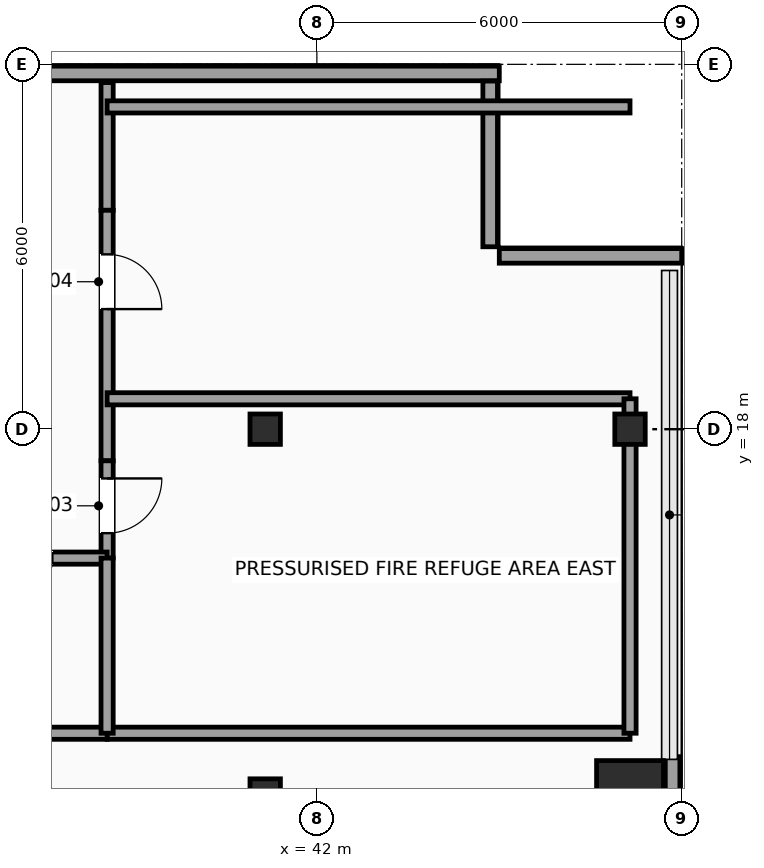
"""IFC4 building model, lengths in metres.
Left out: names, types, materials, properties, quantities, classifications, styles, units other than length and angle.
Written with IfcOpenShell. Run it as: python <this file> out.ifc"""

import sys

from ifc_helpers import new_model, si_unit, direction, frame, frame_2d, origin, origin_2d, place, context, subcontext, project, spatial, rectangle, hollow_rectangle, extrude, element, fill, save


model = new_model("IFC4")
c1 = context("Model", 3, precision=1e-05, world=origin(), true_north=direction((0.0, 1.0)))
c2 = subcontext(c1, "Body", "Model", "MODEL_VIEW")
j1 = project(units=[si_unit("LENGTHUNIT", "METRE"), si_unit("PLANEANGLEUNIT", "RADIAN")], contexts=[c1])
p1 = place(None, origin())
s1 = spatial("IfcSite", under=j1, at=p1, CompositionType="ELEMENT")
p2 = place(p1, origin())
s2 = spatial("IfcBuilding", under=s1, at=p2, CompositionType="ELEMENT")
p3 = place(p2, frame((0.0, 0.0, 164.4)))
s3 = spatial("IfcBuildingStorey", under=s2, at=p3, CompositionType="ELEMENT", Elevation=164.4)
for number, where, z_axis, x_axis in (
    (1, (41.15, 12.0, 0.0), (0.0, 0.0, 1.0), (1.0, 0.0, 0.0)),
    (2, (41.15, 18.0, 0.0), (0.0, 0.0, 1.0), (1.0, 0.0, 0.0)),
):
    element("IfcColumn", number, at=place(p3, frame(where, z_axis=z_axis, x_axis=x_axis)), inside=s3, PredefinedType="COLUMN", context=c2, shape_type="SweptSolid", body=[
        extrude(hollow_rectangle(XDim=0.5, YDim=0.5, WallThickness=0.025, InnerFilletRadius=0.025, OuterFilletRadius=0.04, at=origin_2d()), origin(), (0.0, 0.0, 1.0), 4.8),
    ])
p4 = place(p3, frame((47.15, 12.0, 0.0), z_axis=(0.0, 0.0, 1.0), x_axis=(1.0, 0.0, 0.0)))
e3 = element("IfcColumn", 3, at=p4, inside=s3, PredefinedType="COLUMN", context=c2, shape_type="SweptSolid", body=[
    extrude(rectangle(XDim=1.1, YDim=1.1, at=origin_2d()), origin(), (0.0, 0.0, 1.0), 4.56),
])
p5 = place(p3, frame((47.15, 18.0, 0.0), z_axis=(0.0, 0.0, 1.0), x_axis=(1.0, 0.0, 0.0)))
e4 = element("IfcColumn", 4, at=p5, inside=s3, PredefinedType="COLUMN", context=c2, shape_type="SweptSolid", body=[
    extrude(hollow_rectangle(XDim=0.5, YDim=0.5, WallThickness=0.025, InnerFilletRadius=0.025, OuterFilletRadius=0.04, at=origin_2d()), origin(), (0.0, 0.0, 1.0), 4.56),
])
p6 = place(p3, frame((24.0, 23.85, 0.0), z_axis=(0.0, 0.0, 1.0), x_axis=(1.0, 0.0, 0.0)))
e5 = element("IfcWall", 5, at=p6, inside=s3, PredefinedType="SOLIDWALL", context=c2, shape_type="SweptSolid", body=[
    extrude(rectangle(XDim=21.0, YDim=0.24, at=frame_2d((10.5, 0.0))), origin(), (0.0, 0.0, 1.0), 4.59),
])
p7 = place(p3, frame((44.85, 23.725, 0.0), z_axis=(0.0, 0.0, 1.0), x_axis=(0.0, -1.0, 0.0)))
e6 = element("IfcWall", 6, at=p7, inside=s3, PredefinedType="SOLIDWALL", context=c2, shape_type="SweptSolid", body=[
    extrude(rectangle(XDim=2.725, YDim=0.24, at=frame_2d((1.363, 0.0))), origin(), (0.0, 0.0, 1.0), 4.59),
])
p8 = place(p3, frame((45.0, 20.85, 0.0), z_axis=(0.0, 0.0, 1.0), x_axis=(1.0, 0.0, 0.0)))
e7 = element("IfcWall", 7, at=p8, inside=s3, PredefinedType="SOLIDWALL", context=c2, shape_type="SweptSolid", body=[
    extrude(rectangle(XDim=3.0, YDim=0.24, at=frame_2d((1.5, 0.0))), origin(), (0.0, 0.0, 1.0), 4.59),
])
p9 = place(p3, frame((47.85, 12.615, 0.0), z_axis=(0.0, 0.0, 1.0), x_axis=(0.0, -1.0, 0.0)))
e8 = element("IfcWall", 8, at=p9, inside=s3, PredefinedType="SOLIDWALL", context=c2, shape_type="SweptSolid", body=[
    extrude(rectangle(XDim=1.23, YDim=0.24, at=frame_2d((0.615, 0.0))), origin(), (0.0, 0.0, 1.0), 4.59),
])
p10 = place(p3, frame((38.55, 23.7, 0.0), z_axis=(0.0, 0.0, 1.0), x_axis=(0.0, -1.0, 0.0)))
e9 = element("IfcWall", 9, at=p10, inside=s3, PredefinedType="SOLIDWALL", context=c2, shape_type="SweptSolid", body=[
    extrude(rectangle(XDim=2.1, YDim=0.2, at=frame_2d((1.05, 0.0))), origin(), (0.0, 0.0, 1.0), 4.59),
])
p11 = place(p3, frame((38.55, 21.6, 0.0), z_axis=(0.0, 0.0, 1.0), x_axis=(0.0, -1.0, 0.0)))
e10 = element("IfcWall", 10, at=p11, inside=s3, PredefinedType="SOLIDWALL", context=c2, shape_type="SweptSolid", body=[
    extrude(rectangle(XDim=4.12, YDim=0.2, at=frame_2d((2.06, 0.0))), origin(), (0.0, 0.0, 1.0), 4.59),
])
p12 = place(p11, frame((0.725, 0.0, 0.0)))
e11 = element("IfcOpeningElement", 11, at=p12, cuts=e10, PredefinedType="OPENING", context=c2, shape_type="SweptSolid", body=[
    extrude(rectangle(XDim=0.9, YDim=2.15, at=frame_2d((0.45, 1.075))), frame((0.0, 0.11, 0.0), z_axis=(0.0, -1.0, 0.0), x_axis=(1.0, 0.0, 0.0)), (0.0, 0.0, 1.0), 0.22),
])
p13 = place(p3, frame((38.55, 17.48, 0.0), z_axis=(0.0, 0.0, 1.0), x_axis=(0.0, -1.0, 0.0)))
e12 = element("IfcWall", 12, at=p13, inside=s3, PredefinedType="SOLIDWALL", context=c2, shape_type="SweptSolid", body=[
    extrude(rectangle(XDim=1.6, YDim=0.2, at=frame_2d((0.8, 0.0))), origin(), (0.0, 0.0, 1.0), 4.59),
])
p14 = place(p13, frame((0.29, 0.0, 0.0)))
e13 = element("IfcOpeningElement", 13, at=p14, cuts=e12, PredefinedType="OPENING", context=c2, shape_type="SweptSolid", body=[
    extrude(rectangle(XDim=0.9, YDim=2.15, at=frame_2d((0.45, 1.075))), frame((0.0, 0.11, 0.0), z_axis=(0.0, -1.0, 0.0), x_axis=(1.0, 0.0, 0.0)), (0.0, 0.0, 1.0), 0.22),
])
p15 = place(p3, frame((38.55, 15.88, 0.0), z_axis=(0.0, 0.0, 1.0), x_axis=(-1.0, 0.0, 0.0)))
e14 = element("IfcWall", 14, at=p15, inside=s3, PredefinedType="SOLIDWALL", context=c2, shape_type="SweptSolid", body=[
    extrude(rectangle(XDim=2.3, YDim=0.2, at=frame_2d((1.15, 0.0))), origin(), (0.0, 0.0, 1.0), 4.59),
])
p16 = place(p15, frame((0.9, 0.0, 0.0)))
e15 = element("IfcOpeningElement", 15, at=p16, cuts=e14, PredefinedType="OPENING", context=c2, shape_type="SweptSolid", body=[
    extrude(rectangle(XDim=0.9, YDim=2.15, at=frame_2d((0.45, 1.075))), frame((0.0, 0.11, 0.0), z_axis=(0.0, -1.0, 0.0), x_axis=(1.0, 0.0, 0.0)), (0.0, 0.0, 1.0), 0.22),
])
for number, where, z_axis, x_axis in (
    (16, (38.55, 13.0, 0.0), (0.0, 0.0, 1.0), (1.0, 0.0, 0.0)),
    (17, (38.55, 18.5, 0.0), (0.0, 0.0, 1.0), (1.0, 0.0, 0.0)),
):
    element("IfcWall", number, at=place(p3, frame(where, z_axis=z_axis, x_axis=x_axis)), inside=s3, PredefinedType="SOLIDWALL", context=c2, shape_type="SweptSolid", body=[
        extrude(rectangle(XDim=8.6, YDim=0.2, at=frame_2d((4.3, 0.0))), origin(), (0.0, 0.0, 1.0), 4.59),
    ])
p17 = place(p3, frame((47.15, 13.0, 0.0), z_axis=(0.0, 0.0, 1.0), x_axis=(0.0, 1.0, 0.0)))
e18 = element("IfcWall", 18, at=p17, inside=s3, PredefinedType="SOLIDWALL", context=c2, shape_type="SweptSolid", body=[
    extrude(rectangle(XDim=5.5, YDim=0.2, at=frame_2d((2.75, 0.0))), origin(), (0.0, 0.0, 1.0), 4.052),
])
p18 = place(p3, frame((38.55, 23.3, 0.0), z_axis=(0.0, 0.0, 1.0), x_axis=(1.0, 0.0, 0.0)))
e19 = element("IfcWall", 19, at=p18, inside=s3, PredefinedType="SOLIDWALL", context=c2, shape_type="SweptSolid", body=[
    extrude(rectangle(XDim=8.6, YDim=0.2, at=frame_2d((4.3, 0.0))), origin(), (0.0, 0.0, 1.0), 4.59),
])
p19 = place(p3, frame((33.65, 13.0, 0.0), z_axis=(0.0, 0.0, 1.0), x_axis=(1.0, 0.0, 0.0)))
e20 = element("IfcWall", 20, at=p19, inside=s3, PredefinedType="SOLIDWALL", context=c2, shape_type="SweptSolid", body=[
    extrude(rectangle(XDim=4.9, YDim=0.2, at=frame_2d((2.45, 0.0))), origin(), (0.0, 0.0, 1.0), 4.59),
])
p20 = place(p3, frame((38.55, 13.0, 0.0), z_axis=(0.0, 0.0, 1.0), x_axis=(0.0, 1.0, 0.0)))
e21 = element("IfcWall", 21, at=p20, inside=s3, PredefinedType="SOLIDWALL", context=c2, shape_type="SweptSolid", body=[
    extrude(rectangle(XDim=2.88, YDim=0.2, at=frame_2d((1.44, 0.0))), origin(), (0.0, 0.0, 1.0), 4.59),
])
p21 = place(p12, origin())
e22 = element("IfcDoor", 22, at=p21, inside=s3, OperationType="SINGLE_SWING_RIGHT", PredefinedType="DOOR", context=c2, shape_type="SweptSolid", body=[
    extrude(rectangle(XDim=0.9, YDim=2.15, at=frame_2d((0.45, 1.075))), frame((0.0, 0.025, 0.0), z_axis=(0.0, -1.0, 0.0), x_axis=(1.0, 0.0, 0.0)), (0.0, 0.0, 1.0), 0.05),
])
fill(e11, e22)
p22 = place(p14, origin())
e23 = element("IfcDoor", 23, at=p22, inside=s3, OperationType="SINGLE_SWING_LEFT", PredefinedType="DOOR", context=c2, shape_type="SweptSolid", body=[
    extrude(rectangle(XDim=0.9, YDim=2.15, at=frame_2d((0.45, 1.075))), frame((0.0, 0.025, 0.0), z_axis=(0.0, -1.0, 0.0), x_axis=(1.0, 0.0, 0.0)), (0.0, 0.0, 1.0), 0.05),
])
fill(e13, e23)
p23 = place(p16, origin())
e24 = element("IfcDoor", 24, at=p23, inside=s3, OperationType="SINGLE_SWING_RIGHT", PredefinedType="DOOR", context=c2, shape_type="SweptSolid", body=[
    extrude(rectangle(XDim=0.9, YDim=2.15, at=frame_2d((0.45, 1.075))), frame((0.0, 0.025, 0.0), z_axis=(0.0, -1.0, 0.0), x_axis=(1.0, 0.0, 0.0)), (0.0, 0.0, 1.0), 0.05),
])
fill(e15, e24)
save(model, sys.argv[1])
